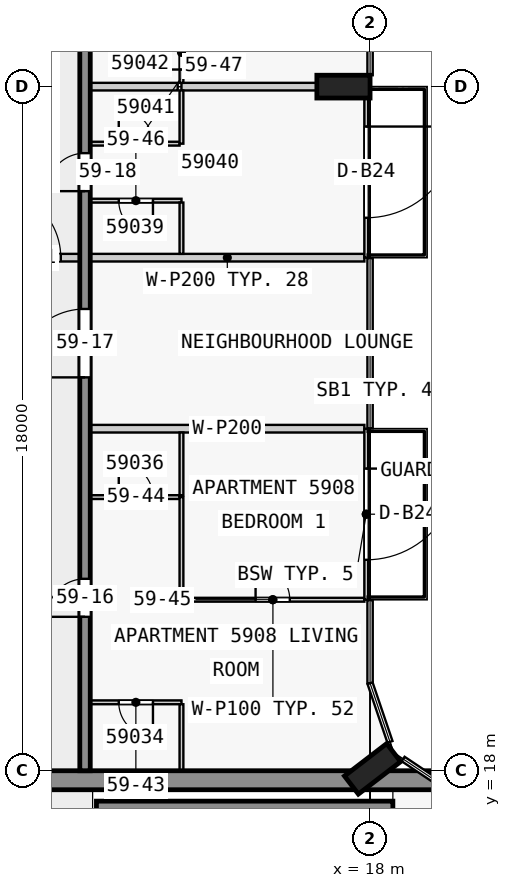
"""IFC4 building model, lengths in metres.
Left out: names, types, materials, properties, quantities, classifications, styles, units other than length and angle.
Written with IfcOpenShell. Run it as: python <this file> out.ifc"""

import sys

from ifc_helpers import new_model, si_unit, direction, frame, frame_2d, origin, origin_2d, place, context, subcontext, project, spatial, rectangle, extrude, element, fill, save


model = new_model("IFC4")
c1 = context("Model", 3, precision=1e-05, world=origin(), true_north=direction((0.0, 1.0)))
c2 = subcontext(c1, "Body", "Model", "MODEL_VIEW")
j1 = project(units=[si_unit("LENGTHUNIT", "METRE"), si_unit("PLANEANGLEUNIT", "RADIAN")], contexts=[c1])
p1 = place(None, origin())
s1 = spatial("IfcSite", under=j1, at=p1, CompositionType="ELEMENT")
p2 = place(p1, origin())
s2 = spatial("IfcBuilding", under=s1, at=p2, CompositionType="ELEMENT")
p3 = place(p2, frame((0.0, 0.0, 225.9)))
s3 = spatial("IfcBuildingStorey", under=s2, at=p3, CompositionType="ELEMENT", Elevation=225.9)
for number, where, z_axis, x_axis in (
    (1, (18.065, 18.05, 0.0), (0.0, 0.0, 1.0), (-0.609, 0.793, 0.0)),
    (2, (17.3, 36.0, 0.0), (0.0, 0.0, 1.0), (0.0, 1.0, 0.0)),
):
    element("IfcColumn", number, at=place(p3, frame(where, z_axis=z_axis, x_axis=x_axis)), inside=s3, PredefinedType="COLUMN", context=c2, shape_type="SweptSolid", body=[
        extrude(rectangle(XDim=0.6, YDim=1.4, at=origin_2d()), origin(), (0.0, 0.0, 1.0), 3.5),
    ])
p4 = place(p3, frame((1.38, 17.75, 0.0), z_axis=(0.0, 0.0, 1.0), x_axis=(1.0, 0.0, 0.0)))
e3 = element("IfcWall", 3, at=p4, inside=s3, PredefinedType="SHEAR", context=c2, shape_type="SweptSolid", body=[
    extrude(rectangle(XDim=21.12, YDim=0.5, at=frame_2d((10.56, 0.0))), origin(), (0.0, 0.0, 1.0), 3.05),
])
p5 = place(p4, frame((6.3, 0.0, 0.0)))
e4 = element("IfcOpeningElement", 4, at=p5, cuts=e3, PredefinedType="OPENING", context=c2, shape_type="SweptSolid", body=[
    extrude(rectangle(XDim=1.8, YDim=2.1, at=frame_2d((0.9, 1.05))), frame((0.0, 0.26, 0.0), z_axis=(0.0, -1.0, 0.0), x_axis=(1.0, 0.0, 0.0)), (0.0, 0.0, 1.0), 0.52),
])
p6 = place(p3, frame((10.8, 17.05, 0.0), z_axis=(0.0, 0.0, 1.0), x_axis=(1.0, 0.0, 0.0)))
e5 = element("IfcWall", 5, at=p6, inside=s3, PredefinedType="SHEAR", context=c2, shape_type="SweptSolid", body=[
    extrude(rectangle(XDim=7.8, YDim=0.3, at=frame_2d((3.9, 0.0))), origin(), (0.0, 0.0, 1.0), 3.05),
])
p7 = place(p3, frame((10.5, 18.0, 0.0), z_axis=(0.0, 0.0, 1.0), x_axis=(0.0, 1.0, 0.0)))
e6 = element("IfcWall", 6, at=p7, inside=s3, PredefinedType="SHEAR", context=c2, shape_type="SweptSolid", body=[
    extrude(rectangle(XDim=27.0, YDim=0.275, at=frame_2d((13.5, 0.0))), origin(), (0.0, 0.0, 1.0), 3.05),
])
p8 = place(p7, frame((4.05, 0.0, 0.0)))
e7 = element("IfcOpeningElement", 7, at=p8, cuts=e6, PredefinedType="OPENING", context=c2, shape_type="SweptSolid", body=[
    extrude(rectangle(XDim=1.0, YDim=2.1, at=frame_2d((0.5, 1.05))), frame((0.0, 0.147, 0.0), z_axis=(0.0, -1.0, 0.0), x_axis=(1.0, 0.0, 0.0)), (0.0, 0.0, 1.0), 0.295),
])
p9 = place(p7, frame((10.35, 0.0, 0.0)))
e8 = element("IfcOpeningElement", 8, at=p9, cuts=e6, PredefinedType="OPENING", context=c2, shape_type="SweptSolid", body=[
    extrude(rectangle(XDim=1.8, YDim=2.1, at=frame_2d((0.9, 1.05))), frame((0.0, 0.147, 0.0), z_axis=(0.0, -1.0, 0.0), x_axis=(1.0, 0.0, 0.0)), (0.0, 0.0, 1.0), 0.295),
])
p10 = place(p7, frame((15.25, 0.0, 0.0)))
e9 = element("IfcOpeningElement", 9, at=p10, cuts=e6, PredefinedType="OPENING", context=c2, shape_type="SweptSolid", body=[
    extrude(rectangle(XDim=1.0, YDim=2.1, at=frame_2d((0.5, 1.05))), frame((0.0, 0.147, 0.0), z_axis=(0.0, -1.0, 0.0), x_axis=(1.0, 0.0, 0.0)), (0.0, 0.0, 1.0), 0.295),
])
p11 = place(p7, frame((21.35, 0.0, 0.0)))
e10 = element("IfcOpeningElement", 10, at=p11, cuts=e6, PredefinedType="OPENING", context=c2, shape_type="SweptSolid", body=[
    extrude(rectangle(XDim=1.0, YDim=2.1, at=frame_2d((0.5, 1.05))), frame((0.0, 0.147, 0.0), z_axis=(0.0, -1.0, 0.0), x_axis=(1.0, 0.0, 0.0)), (0.0, 0.0, 1.0), 0.295),
])
p12 = place(p3, frame((17.9, 27.0, 0.0), z_axis=(0.0, 0.0, 1.0), x_axis=(0.0, -1.0, 0.0)))
e11 = element("IfcWall", 11, at=p12, inside=s3, PredefinedType="STANDARD", context=c2, shape_type="SweptSolid", body=[
    extrude(rectangle(XDim=4.5, YDim=0.1, at=frame_2d((2.25, 0.0))), origin(), (0.0, 0.0, 1.0), 3.05),
])
p13 = place(p12, frame((1.05, 0.0, 0.0)))
e12 = element("IfcOpeningElement", 12, at=p13, cuts=e11, PredefinedType="OPENING", context=c2, shape_type="SweptSolid", body=[
    extrude(rectangle(XDim=2.4, YDim=2.4, at=frame_2d((1.2, 1.2))), frame((0.0, 0.06, 0.0), z_axis=(0.0, -1.0, 0.0), x_axis=(1.0, 0.0, 0.0)), (0.0, 0.0, 1.0), 0.12),
])
p14 = place(p3, frame((17.9, 36.0, 0.0), z_axis=(0.0, 0.0, 1.0), x_axis=(0.0, -1.0, 0.0)))
e13 = element("IfcWall", 13, at=p14, inside=s3, PredefinedType="STANDARD", context=c2, shape_type="SweptSolid", body=[
    extrude(rectangle(XDim=4.5, YDim=0.1, at=frame_2d((2.25, 0.0))), origin(), (0.0, 0.0, 1.0), 3.05),
])
p15 = place(p14, frame((1.05, 0.0, 0.0)))
e14 = element("IfcOpeningElement", 14, at=p15, cuts=e13, PredefinedType="OPENING", context=c2, shape_type="SweptSolid", body=[
    extrude(rectangle(XDim=2.4, YDim=2.4, at=frame_2d((1.2, 1.2))), frame((0.0, 0.06, 0.0), z_axis=(0.0, -1.0, 0.0), x_axis=(1.0, 0.0, 0.0)), (0.0, 0.0, 1.0), 0.12),
])
p16 = place(p3, frame((13.038, 19.8, 0.0), z_axis=(0.0, 0.0, 1.0), x_axis=(-1.0, 0.0, 0.0)))
e15 = element("IfcWall", 15, at=p16, inside=s3, PredefinedType="PARTITIONING", context=c2, shape_type="SweptSolid", body=[
    extrude(rectangle(XDim=2.4, YDim=0.1, at=frame_2d((1.2, 0.0))), origin(), (0.0, 0.0, 1.0), 3.05),
])
p17 = place(p16, frame((0.75, 0.0, 0.0)))
e16 = element("IfcOpeningElement", 16, at=p17, cuts=e15, PredefinedType="OPENING", context=c2, shape_type="SweptSolid", body=[
    extrude(rectangle(XDim=0.9, YDim=2.1, at=frame_2d((0.45, 1.05))), frame((0.0, 0.06, 0.0), z_axis=(0.0, -1.0, 0.0), x_axis=(1.0, 0.0, 0.0)), (0.0, 0.0, 1.0), 0.12),
])
p18 = place(p3, frame((13.038, 22.5, 0.0), z_axis=(0.0, 0.0, 1.0), x_axis=(1.0, 0.0, 0.0)))
e17 = element("IfcWall", 17, at=p18, inside=s3, PredefinedType="PARTITIONING", context=c2, shape_type="SweptSolid", body=[
    extrude(rectangle(XDim=4.812, YDim=0.1, at=frame_2d((2.406, 0.0))), origin(), (0.0, 0.0, 1.0), 3.05),
])
p19 = place(p18, frame((1.95, 0.0, 0.0)))
e18 = element("IfcOpeningElement", 18, at=p19, cuts=e17, PredefinedType="OPENING", context=c2, shape_type="SweptSolid", body=[
    extrude(rectangle(XDim=0.9, YDim=2.1, at=frame_2d((0.45, 1.05))), frame((0.0, 0.06, 0.0), z_axis=(0.0, -1.0, 0.0), x_axis=(1.0, 0.0, 0.0)), (0.0, 0.0, 1.0), 0.12),
])
p20 = place(p3, frame((10.637, 25.2, 0.0), z_axis=(0.0, 0.0, 1.0), x_axis=(1.0, 0.0, 0.0)))
e19 = element("IfcWall", 19, at=p20, inside=s3, PredefinedType="PARTITIONING", context=c2, shape_type="SweptSolid", body=[
    extrude(rectangle(XDim=2.35, YDim=0.1, at=frame_2d((1.175, 0.0))), origin(), (0.0, 0.0, 1.0), 3.05),
])
p21 = place(p20, frame((0.75, 0.0, 0.0)))
e20 = element("IfcOpeningElement", 20, at=p21, cuts=e19, PredefinedType="OPENING", context=c2, shape_type="SweptSolid", body=[
    extrude(rectangle(XDim=0.9, YDim=2.1, at=frame_2d((0.45, 1.05))), frame((0.0, 0.06, 0.0), z_axis=(0.0, -1.0, 0.0), x_axis=(1.0, 0.0, 0.0)), (0.0, 0.0, 1.0), 0.12),
])
for number, where, z_axis, x_axis in (
    (21, (17.85, 27.0, 0.0), (0.0, 0.0, 1.0), (-1.0, 0.0, 0.0)),
    (22, (17.85, 31.5, 0.0), (0.0, 0.0, 1.0), (-1.0, 0.0, 0.0)),
):
    element("IfcWall", number, at=place(p3, frame(where, z_axis=z_axis, x_axis=x_axis)), inside=s3, PredefinedType="PARTITIONING", context=c2, shape_type="SweptSolid", body=[
        extrude(rectangle(XDim=7.213, YDim=0.2, at=frame_2d((3.606, 0.0))), origin(), (0.0, 0.0, 1.0), 3.05),
    ])
p22 = place(p3, frame((13.038, 33.0, 0.0), z_axis=(0.0, 0.0, 1.0), x_axis=(-1.0, 0.0, 0.0)))
e23 = element("IfcWall", 23, at=p22, inside=s3, PredefinedType="PARTITIONING", context=c2, shape_type="SweptSolid", body=[
    extrude(rectangle(XDim=2.4, YDim=0.1, at=frame_2d((1.2, 0.0))), origin(), (0.0, 0.0, 1.0), 3.05),
])
p23 = place(p22, frame((0.75, 0.0, 0.0)))
e24 = element("IfcOpeningElement", 24, at=p23, cuts=e23, PredefinedType="OPENING", context=c2, shape_type="SweptSolid", body=[
    extrude(rectangle(XDim=0.9, YDim=2.1, at=frame_2d((0.45, 1.05))), frame((0.0, 0.06, 0.0), z_axis=(0.0, -1.0, 0.0), x_axis=(1.0, 0.0, 0.0)), (0.0, 0.0, 1.0), 0.12),
])
p24 = place(p3, frame((10.637, 34.5, 0.0), z_axis=(0.0, 0.0, 1.0), x_axis=(1.0, 0.0, 0.0)))
e25 = element("IfcWall", 25, at=p24, inside=s3, PredefinedType="PARTITIONING", context=c2, shape_type="SweptSolid", body=[
    extrude(rectangle(XDim=2.35, YDim=0.1, at=frame_2d((1.175, 0.0))), origin(), (0.0, 0.0, 1.0), 3.05),
])
p25 = place(p24, frame((0.75, 0.0, 0.0)))
e26 = element("IfcOpeningElement", 26, at=p25, cuts=e25, PredefinedType="OPENING", context=c2, shape_type="SweptSolid", body=[
    extrude(rectangle(XDim=0.9, YDim=2.1, at=frame_2d((0.45, 1.05))), frame((0.0, 0.06, 0.0), z_axis=(0.0, -1.0, 0.0), x_axis=(1.0, 0.0, 0.0)), (0.0, 0.0, 1.0), 0.12),
])
p26 = place(p3, frame((12.938, 36.0, 0.0), z_axis=(0.0, 0.0, 1.0), x_axis=(-1.0, 0.0, 0.0)))
e27 = element("IfcWall", 27, at=p26, inside=s3, PredefinedType="PARTITIONING", context=c2, shape_type="SweptSolid", body=[
    extrude(rectangle(XDim=2.3, YDim=0.2, at=frame_2d((1.15, 0.0))), origin(), (0.0, 0.0, 1.0), 3.05),
])
p27 = place(p3, frame((13.038, 36.0, 0.0), z_axis=(0.0, 0.0, 1.0), x_axis=(1.0, 0.0, 0.0)))
e28 = element("IfcWall", 28, at=p27, inside=s3, PredefinedType="PARTITIONING", context=c2, shape_type="SweptSolid", body=[
    extrude(rectangle(XDim=3.562, YDim=0.2, at=frame_2d((1.781, 0.0))), origin(), (0.0, 0.0, 1.0), 3.05),
])
p28 = place(p3, frame((13.038, 25.2, 0.0), z_axis=(0.0, 0.0, 1.0), x_axis=(0.0, -1.0, 0.0)))
e29 = element("IfcWall", 29, at=p28, inside=s3, PredefinedType="PARTITIONING", context=c2, shape_type="SweptSolid", body=[
    extrude(rectangle(XDim=2.65, YDim=0.1, at=frame_2d((1.325, 0.0))), origin(), (0.0, 0.0, 1.0), 3.05),
])
p29 = place(p3, frame((13.038, 18.0, 0.0), z_axis=(0.0, 0.0, 1.0), x_axis=(0.0, 1.0, 0.0)))
e30 = element("IfcWall", 30, at=p29, inside=s3, PredefinedType="PARTITIONING", context=c2, shape_type="SweptSolid", body=[
    extrude(rectangle(XDim=1.75, YDim=0.1, at=frame_2d((0.875, 0.0))), origin(), (0.0, 0.0, 1.0), 3.05),
])
p30 = place(p3, frame((13.038, 25.25, 0.0), z_axis=(0.0, 0.0, 1.0), x_axis=(0.0, 1.0, 0.0)))
e31 = element("IfcWall", 31, at=p30, inside=s3, PredefinedType="PARTITIONING", context=c2, shape_type="SweptSolid", body=[
    extrude(rectangle(XDim=1.65, YDim=0.1, at=frame_2d((0.825, 0.0))), origin(), (0.0, 0.0, 1.0), 3.05),
])
p31 = place(p3, frame((13.038, 31.6, 0.0), z_axis=(0.0, 0.0, 1.0), x_axis=(0.0, 1.0, 0.0)))
e32 = element("IfcWall", 32, at=p31, inside=s3, PredefinedType="PARTITIONING", context=c2, shape_type="SweptSolid", body=[
    extrude(rectangle(XDim=1.35, YDim=0.1, at=frame_2d((0.675, 0.0))), origin(), (0.0, 0.0, 1.0), 3.05),
])
p32 = place(p3, frame((13.038, 34.5, 0.0), z_axis=(0.0, 0.0, 1.0), x_axis=(0.0, 1.0, 0.0)))
e33 = element("IfcWall", 33, at=p32, inside=s3, PredefinedType="PARTITIONING", context=c2, shape_type="SweptSolid", body=[
    extrude(rectangle(XDim=1.4, YDim=0.1, at=frame_2d((0.7, 0.0))), origin(), (0.0, 0.0, 1.0), 3.05),
])
p33 = place(p3, frame((13.038, 36.1, 0.0), z_axis=(0.0, 0.0, 1.0), x_axis=(0.0, 1.0, 0.0)))
e34 = element("IfcWall", 34, at=p33, inside=s3, PredefinedType="PARTITIONING", context=c2, shape_type="SweptSolid", body=[
    extrude(rectangle(XDim=3.0, YDim=0.1, at=frame_2d((1.5, 0.0))), origin(), (0.0, 0.0, 1.0), 3.05),
])
p34 = place(p33, frame((0.35, 0.0, 0.0)))
e35 = element("IfcOpeningElement", 35, at=p34, cuts=e34, PredefinedType="OPENING", context=c2, shape_type="SweptSolid", body=[
    extrude(rectangle(XDim=0.9, YDim=2.1, at=frame_2d((0.45, 1.05))), frame((0.0, 0.06, 0.0), z_axis=(0.0, -1.0, 0.0), x_axis=(1.0, 0.0, 0.0)), (0.0, 0.0, 1.0), 0.12),
])
p35 = place(p3, frame((7.363, 31.5, 0.0), z_axis=(0.0, 0.0, 1.0), x_axis=(1.0, 0.0, 0.0)))
e36 = element("IfcWall", 36, at=p35, inside=s3, PredefinedType="PARTITIONING", context=c2, shape_type="SweptSolid", body=[
    extrude(rectangle(XDim=3.175, YDim=0.2, at=frame_2d((1.587, 0.0))), origin(), (0.0, 0.0, 1.0), 3.05),
])
p36 = place(p35, frame((0.7, 0.0, 0.0)))
e37 = element("IfcOpeningElement", 37, at=p36, cuts=e36, PredefinedType="OPENING", context=c2, shape_type="SweptSolid", body=[
    extrude(rectangle(XDim=1.8, YDim=2.1, at=frame_2d((0.9, 1.05))), frame((0.0, 0.11, 0.0), z_axis=(0.0, -1.0, 0.0), x_axis=(1.0, 0.0, 0.0)), (0.0, 0.0, 1.0), 0.22),
])
p37 = place(p13, origin())
e38 = element("IfcDoor", 38, at=p37, inside=s3, OperationType="SINGLE_SWING_LEFT", PredefinedType="DOOR", context=c2, shape_type="SweptSolid", body=[
    extrude(rectangle(XDim=2.4, YDim=2.4, at=frame_2d((1.2, 1.2))), frame((0.0, 0.025, 0.0), z_axis=(0.0, -1.0, 0.0), x_axis=(1.0, 0.0, 0.0)), (0.0, 0.0, 1.0), 0.05),
])
fill(e12, e38)
p38 = place(p15, origin())
e39 = element("IfcDoor", 39, at=p38, inside=s3, OperationType="SINGLE_SWING_LEFT", PredefinedType="DOOR", context=c2, shape_type="SweptSolid", body=[
    extrude(rectangle(XDim=2.4, YDim=2.4, at=frame_2d((1.2, 1.2))), frame((0.0, 0.025, 0.0), z_axis=(0.0, -1.0, 0.0), x_axis=(1.0, 0.0, 0.0)), (0.0, 0.0, 1.0), 0.05),
])
fill(e14, e39)
p39 = place(p8, origin())
e40 = element("IfcDoor", 40, at=p39, inside=s3, OperationType="SINGLE_SWING_LEFT", PredefinedType="DOOR", context=c2, shape_type="SweptSolid", body=[
    extrude(rectangle(XDim=1.0, YDim=2.1, at=frame_2d((0.5, 1.05))), frame((0.0, 0.025, 0.0), z_axis=(0.0, -1.0, 0.0), x_axis=(1.0, 0.0, 0.0)), (0.0, 0.0, 1.0), 0.05),
])
fill(e7, e40)
p40 = place(p9, origin())
e41 = element("IfcDoor", 41, at=p40, inside=s3, OperationType="SINGLE_SWING_LEFT", PredefinedType="DOOR", context=c2, shape_type="SweptSolid", body=[
    extrude(rectangle(XDim=1.8, YDim=2.1, at=frame_2d((0.9, 1.05))), frame((0.0, 0.025, 0.0), z_axis=(0.0, -1.0, 0.0), x_axis=(1.0, 0.0, 0.0)), (0.0, 0.0, 1.0), 0.05),
])
fill(e8, e41)
p41 = place(p10, origin())
e42 = element("IfcDoor", 42, at=p41, inside=s3, OperationType="SINGLE_SWING_RIGHT", PredefinedType="DOOR", context=c2, shape_type="SweptSolid", body=[
    extrude(rectangle(XDim=1.0, YDim=2.1, at=frame_2d((0.5, 1.05))), frame((0.0, 0.025, 0.0), z_axis=(0.0, -1.0, 0.0), x_axis=(1.0, 0.0, 0.0)), (0.0, 0.0, 1.0), 0.05),
])
fill(e9, e42)
p42 = place(p36, origin())
e43 = element("IfcDoor", 43, at=p42, inside=s3, OperationType="SINGLE_SWING_RIGHT", PredefinedType="DOOR", context=c2, shape_type="SweptSolid", body=[
    extrude(rectangle(XDim=1.8, YDim=2.1, at=frame_2d((0.9, 1.05))), frame((0.0, 0.025, 0.0), z_axis=(0.0, -1.0, 0.0), x_axis=(1.0, 0.0, 0.0)), (0.0, 0.0, 1.0), 0.05),
])
fill(e37, e43)
p43 = place(p17, origin())
e44 = element("IfcDoor", 44, at=p43, inside=s3, OperationType="SINGLE_SWING_LEFT", PredefinedType="DOOR", context=c2, shape_type="SweptSolid", body=[
    extrude(rectangle(XDim=0.9, YDim=2.1, at=frame_2d((0.45, 1.05))), frame((0.0, 0.025, 0.0), z_axis=(0.0, -1.0, 0.0), x_axis=(1.0, 0.0, 0.0)), (0.0, 0.0, 1.0), 0.05),
])
fill(e16, e44)
p44 = place(p21, origin())
e45 = element("IfcDoor", 45, at=p44, inside=s3, OperationType="SINGLE_SWING_RIGHT", PredefinedType="DOOR", context=c2, shape_type="SweptSolid", body=[
    extrude(rectangle(XDim=0.9, YDim=2.1, at=frame_2d((0.45, 1.05))), frame((0.0, 0.025, 0.0), z_axis=(0.0, -1.0, 0.0), x_axis=(1.0, 0.0, 0.0)), (0.0, 0.0, 1.0), 0.05),
])
fill(e20, e45)
p45 = place(p19, origin())
e46 = element("IfcDoor", 46, at=p45, inside=s3, OperationType="SINGLE_SWING_LEFT", PredefinedType="DOOR", context=c2, shape_type="SweptSolid", body=[
    extrude(rectangle(XDim=0.9, YDim=2.1, at=frame_2d((0.45, 1.05))), frame((0.0, 0.025, 0.0), z_axis=(0.0, -1.0, 0.0), x_axis=(1.0, 0.0, 0.0)), (0.0, 0.0, 1.0), 0.05),
])
fill(e18, e46)
p46 = place(p23, origin())
e47 = element("IfcDoor", 47, at=p46, inside=s3, OperationType="SINGLE_SWING_LEFT", PredefinedType="DOOR", context=c2, shape_type="SweptSolid", body=[
    extrude(rectangle(XDim=0.9, YDim=2.1, at=frame_2d((0.45, 1.05))), frame((0.0, 0.025, 0.0), z_axis=(0.0, -1.0, 0.0), x_axis=(1.0, 0.0, 0.0)), (0.0, 0.0, 1.0), 0.05),
])
fill(e24, e47)
p47 = place(p25, origin())
e48 = element("IfcDoor", 48, at=p47, inside=s3, OperationType="SINGLE_SWING_RIGHT", PredefinedType="DOOR", context=c2, shape_type="SweptSolid", body=[
    extrude(rectangle(XDim=0.9, YDim=2.1, at=frame_2d((0.45, 1.05))), frame((0.0, 0.025, 0.0), z_axis=(0.0, -1.0, 0.0), x_axis=(1.0, 0.0, 0.0)), (0.0, 0.0, 1.0), 0.05),
])
fill(e26, e48)
p48 = place(p34, origin())
e49 = element("IfcDoor", 49, at=p48, inside=s3, OperationType="SINGLE_SWING_LEFT", PredefinedType="DOOR", context=c2, shape_type="SweptSolid", body=[
    extrude(rectangle(XDim=0.9, YDim=2.1, at=frame_2d((0.45, 1.05))), frame((0.0, 0.025, 0.0), z_axis=(0.0, -1.0, 0.0), x_axis=(1.0, 0.0, 0.0)), (0.0, 0.0, 1.0), 0.05),
])
fill(e35, e49)
save(model, sys.argv[1])
